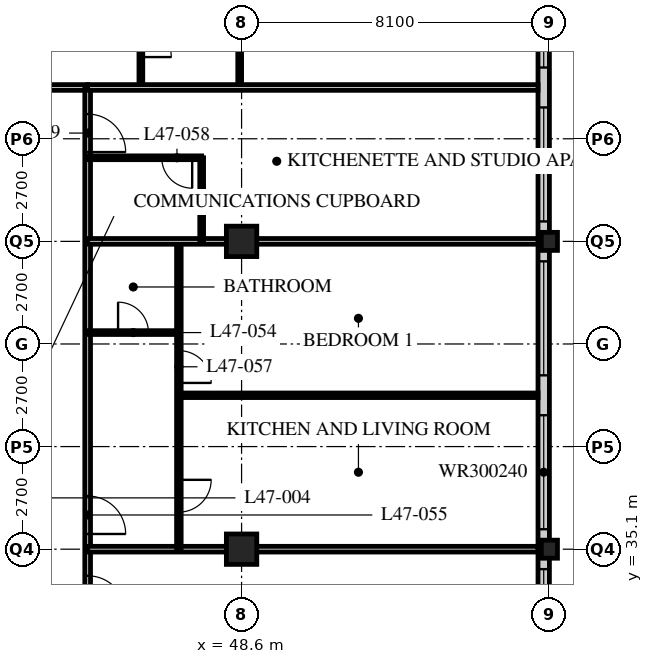
"""IFC4 building model, lengths in metres.
Left out: names, types, materials, properties, quantities, classifications, styles, units other than length and angle.
Written with IfcOpenShell. Run it as: python <this file> out.ifc"""

import sys

from ifc_helpers import new_model, si_unit, direction, frame, frame_2d, origin, origin_2d, place, context, subcontext, project, spatial, rectangle, hollow_rectangle, i_section, extrude, element, fill, save


model = new_model("IFC4")
c1 = context("Model", 3, precision=1e-05, world=origin(), true_north=direction((0.0, 1.0)))
c2 = subcontext(c1, "Body", "Model", "MODEL_VIEW")
j1 = project(units=[si_unit("LENGTHUNIT", "METRE"), si_unit("PLANEANGLEUNIT", "RADIAN")], contexts=[c1])
p1 = place(None, origin())
s1 = spatial("IfcSite", under=j1, at=p1, CompositionType="ELEMENT")
p2 = place(p1, origin())
s2 = spatial("IfcBuilding", under=s1, at=p2, CompositionType="ELEMENT")
p3 = place(p2, frame((0.0, 0.0, 184.8)))
s3 = spatial("IfcBuildingStorey", under=s2, at=p3, CompositionType="ELEMENT", Elevation=184.8)
for number, where, z_axis, x_axis in (
    (1, (48.6, 35.1, 0.0), (0.0, 0.0, 1.0), (1.0, 0.0, 0.0)),
    (2, (48.6, 43.2, 0.0), (0.0, 0.0, 1.0), (1.0, 0.0, 0.0)),
):
    element("IfcColumn", number, at=place(p3, frame(where, z_axis=z_axis, x_axis=x_axis)), inside=s3, PredefinedType="COLUMN", context=c2, shape_type="SweptSolid", body=[
        extrude(hollow_rectangle(XDim=0.8, YDim=0.8, WallThickness=0.08, at=origin_2d()), origin(), (0.0, 0.0, 1.0), 3.6),
    ])
for number, where, z_axis, x_axis in (
    (3, (56.7, 35.1, 0.0), (0.0, 0.0, 1.0), (1.0, 0.0, 0.0)),
    (4, (56.7, 43.2, 0.0), (0.0, 0.0, 1.0), (1.0, 0.0, 0.0)),
):
    element("IfcColumn", number, at=place(p3, frame(where, z_axis=z_axis, x_axis=x_axis)), inside=s3, PredefinedType="COLUMN", context=c2, shape_type="SweptSolid", body=[
        extrude(i_section(OverallWidth=0.424, OverallDepth=0.475, WebThickness=0.048, FlangeThickness=0.077, FilletRadius=0.015, at=origin_2d()), origin(), (0.0, 0.0, 1.0), 3.6),
    ])
p4 = place(p3, frame((56.55, 19.2, 0.0), z_axis=(0.0, 0.0, 1.0), x_axis=(0.0, 1.0, 0.0)))
e5 = element("IfcWall", 5, at=p4, inside=s3, PredefinedType="SOLIDWALL", context=c2, shape_type="SweptSolid", body=[
    extrude(rectangle(XDim=32.1, YDim=0.3, at=frame_2d((16.05, 0.0))), origin(), (0.0, 0.0, 1.0), 3.39),
])
p5 = place(p4, frame((0.225, 0.0, 0.6)))
e6 = element("IfcOpeningElement", 6, at=p5, cuts=e5, PredefinedType="OPENING", context=c2, shape_type="SweptSolid", body=[
    extrude(rectangle(XDim=3.0, YDim=2.4, at=frame_2d((1.5, 1.2))), frame((0.0, 0.16, 0.0), z_axis=(0.0, -1.0, 0.0), x_axis=(1.0, 0.0, 0.0)), (0.0, 0.0, 1.0), 0.32),
])
p6 = place(p4, frame((4.275, 0.0, 0.6)))
e7 = element("IfcOpeningElement", 7, at=p6, cuts=e5, PredefinedType="OPENING", context=c2, shape_type="SweptSolid", body=[
    extrude(rectangle(XDim=3.0, YDim=2.4, at=frame_2d((1.5, 1.2))), frame((0.0, 0.16, 0.0), z_axis=(0.0, -1.0, 0.0), x_axis=(1.0, 0.0, 0.0)), (0.0, 0.0, 1.0), 0.32),
])
p7 = place(p4, frame((8.325, 0.0, 0.6)))
e8 = element("IfcOpeningElement", 8, at=p7, cuts=e5, PredefinedType="OPENING", context=c2, shape_type="SweptSolid", body=[
    extrude(rectangle(XDim=3.0, YDim=2.4, at=frame_2d((1.5, 1.2))), frame((0.0, 0.16, 0.0), z_axis=(0.0, -1.0, 0.0), x_axis=(1.0, 0.0, 0.0)), (0.0, 0.0, 1.0), 0.32),
])
p8 = place(p4, frame((12.375, 0.0, 0.6)))
e9 = element("IfcOpeningElement", 9, at=p8, cuts=e5, PredefinedType="OPENING", context=c2, shape_type="SweptSolid", body=[
    extrude(rectangle(XDim=3.0, YDim=2.4, at=frame_2d((1.5, 1.2))), frame((0.0, 0.16, 0.0), z_axis=(0.0, -1.0, 0.0), x_axis=(1.0, 0.0, 0.0)), (0.0, 0.0, 1.0), 0.32),
])
p9 = place(p4, frame((16.425, 0.0, 0.6)))
e10 = element("IfcOpeningElement", 10, at=p9, cuts=e5, PredefinedType="OPENING", context=c2, shape_type="SweptSolid", body=[
    extrude(rectangle(XDim=3.0, YDim=2.4, at=frame_2d((1.5, 1.2))), frame((0.0, 0.16, 0.0), z_axis=(0.0, -1.0, 0.0), x_axis=(1.0, 0.0, 0.0)), (0.0, 0.0, 1.0), 0.32),
])
p10 = place(p4, frame((20.475, 0.0, 0.6)))
e11 = element("IfcOpeningElement", 11, at=p10, cuts=e5, PredefinedType="OPENING", context=c2, shape_type="SweptSolid", body=[
    extrude(rectangle(XDim=3.0, YDim=2.4, at=frame_2d((1.5, 1.2))), frame((0.0, 0.16, 0.0), z_axis=(0.0, -1.0, 0.0), x_axis=(1.0, 0.0, 0.0)), (0.0, 0.0, 1.0), 0.32),
])
p11 = place(p4, frame((24.525, 0.0, 0.6)))
e12 = element("IfcOpeningElement", 12, at=p11, cuts=e5, PredefinedType="OPENING", context=c2, shape_type="SweptSolid", body=[
    extrude(rectangle(XDim=3.0, YDim=2.4, at=frame_2d((1.5, 1.2))), frame((0.0, 0.16, 0.0), z_axis=(0.0, -1.0, 0.0), x_axis=(1.0, 0.0, 0.0)), (0.0, 0.0, 1.0), 0.32),
])
p12 = place(p4, frame((28.575, 0.0, 0.6)))
e13 = element("IfcOpeningElement", 13, at=p12, cuts=e5, PredefinedType="OPENING", context=c2, shape_type="SweptSolid", body=[
    extrude(rectangle(XDim=3.0, YDim=2.4, at=frame_2d((1.5, 1.2))), frame((0.0, 0.16, 0.0), z_axis=(0.0, -1.0, 0.0), x_axis=(1.0, 0.0, 0.0)), (0.0, 0.0, 1.0), 0.32),
])
p13 = place(p3, frame((12.15, 47.25, 0.0), z_axis=(0.0, 0.0, 1.0), x_axis=(1.0, 0.0, 0.0)))
e14 = element("IfcWall", 14, at=p13, inside=s3, PredefinedType="PARTITIONING", context=c2, shape_type="SweptSolid", body=[
    extrude(rectangle(XDim=32.4, YDim=0.15, at=frame_2d((16.2, 0.0))), origin(), (0.0, 0.0, 1.0), 3.39),
])
p14 = place(p13, frame((4.45, 0.0, 0.0)))
e15 = element("IfcOpeningElement", 15, at=p14, cuts=e14, PredefinedType="OPENING", context=c2, shape_type="SweptSolid", body=[
    extrude(rectangle(XDim=1.0, YDim=2.1, at=frame_2d((0.5, 1.05))), frame((0.0, 0.085, 0.0), z_axis=(0.0, -1.0, 0.0), x_axis=(1.0, 0.0, 0.0)), (0.0, 0.0, 1.0), 0.17),
])
p15 = place(p13, frame((16.6, 0.0, 0.0)))
e16 = element("IfcOpeningElement", 16, at=p15, cuts=e14, PredefinedType="OPENING", context=c2, shape_type="SweptSolid", body=[
    extrude(rectangle(XDim=1.0, YDim=2.1, at=frame_2d((0.5, 1.05))), frame((0.0, 0.085, 0.0), z_axis=(0.0, -1.0, 0.0), x_axis=(1.0, 0.0, 0.0)), (0.0, 0.0, 1.0), 0.17),
])
p16 = place(p13, frame((29.875, 0.0, 0.0)))
e17 = element("IfcOpeningElement", 17, at=p16, cuts=e14, PredefinedType="OPENING", context=c2, shape_type="SweptSolid", body=[
    extrude(rectangle(XDim=1.0, YDim=2.1, at=frame_2d((0.5, 1.05))), frame((0.0, 0.085, 0.0), z_axis=(0.0, -1.0, 0.0), x_axis=(1.0, 0.0, 0.0)), (0.0, 0.0, 1.0), 0.17),
])
p17 = place(p13, frame((1.525, 0.0, 0.0)))
e18 = element("IfcOpeningElement", 18, at=p17, cuts=e14, PredefinedType="OPENING", context=c2, shape_type="SweptSolid", body=[
    extrude(rectangle(XDim=1.0, YDim=2.1, at=frame_2d((0.5, 1.05))), frame((0.0, 0.085, 0.0), z_axis=(0.0, -1.0, 0.0), x_axis=(1.0, 0.0, 0.0)), (0.0, 0.0, 1.0), 0.17),
])
p18 = place(p3, frame((44.55, 18.9, 0.0), z_axis=(0.0, 0.0, 1.0), x_axis=(0.0, 1.0, 0.0)))
e19 = element("IfcWall", 19, at=p18, inside=s3, PredefinedType="PARTITIONING", context=c2, shape_type="SweptSolid", body=[
    extrude(rectangle(XDim=28.35, YDim=0.15, at=frame_2d((14.175, 0.0))), origin(), (0.0, 0.0, 1.0), 3.39),
])
p19 = place(p18, frame((0.4, 0.0, 0.0)))
e20 = element("IfcOpeningElement", 20, at=p19, cuts=e19, PredefinedType="OPENING", context=c2, shape_type="SweptSolid", body=[
    extrude(rectangle(XDim=1.0, YDim=2.1, at=frame_2d((0.5, 1.05))), frame((0.0, 0.085, 0.0), z_axis=(0.0, -1.0, 0.0), x_axis=(1.0, 0.0, 0.0)), (0.0, 0.0, 1.0), 0.17),
])
p20 = place(p18, frame((10.45, 0.0, 0.0)))
e21 = element("IfcOpeningElement", 21, at=p20, cuts=e19, PredefinedType="OPENING", context=c2, shape_type="SweptSolid", body=[
    extrude(rectangle(XDim=1.0, YDim=2.1, at=frame_2d((0.5, 1.05))), frame((0.0, 0.085, 0.0), z_axis=(0.0, -1.0, 0.0), x_axis=(1.0, 0.0, 0.0)), (0.0, 0.0, 1.0), 0.17),
])
p21 = place(p18, frame((14.5, 0.0, 0.0)))
e22 = element("IfcOpeningElement", 22, at=p21, cuts=e19, PredefinedType="OPENING", context=c2, shape_type="SweptSolid", body=[
    extrude(rectangle(XDim=1.0, YDim=2.1, at=frame_2d((0.5, 1.05))), frame((0.0, 0.085, 0.0), z_axis=(0.0, -1.0, 0.0), x_axis=(1.0, 0.0, 0.0)), (0.0, 0.0, 1.0), 0.17),
])
p22 = place(p18, frame((16.6, 0.0, 0.0)))
e23 = element("IfcOpeningElement", 23, at=p22, cuts=e19, PredefinedType="OPENING", context=c2, shape_type="SweptSolid", body=[
    extrude(rectangle(XDim=1.0, YDim=2.1, at=frame_2d((0.5, 1.05))), frame((0.0, 0.085, 0.0), z_axis=(0.0, -1.0, 0.0), x_axis=(1.0, 0.0, 0.0)), (0.0, 0.0, 1.0), 0.17),
])
p23 = place(p18, frame((26.65, 0.0, 0.0)))
e24 = element("IfcOpeningElement", 24, at=p23, cuts=e19, PredefinedType="OPENING", context=c2, shape_type="SweptSolid", body=[
    extrude(rectangle(XDim=1.0, YDim=2.1, at=frame_2d((0.5, 1.05))), frame((0.0, 0.085, 0.0), z_axis=(0.0, -1.0, 0.0), x_axis=(1.0, 0.0, 0.0)), (0.0, 0.0, 1.0), 0.17),
])
p24 = place(p3, frame((44.55, 35.1, 0.0), z_axis=(0.0, 0.0, 1.0), x_axis=(1.0, 0.0, 0.0)))
e25 = element("IfcWall", 25, at=p24, inside=s3, PredefinedType="PARTITIONING", context=c2, shape_type="SweptSolid", body=[
    extrude(rectangle(XDim=11.85, YDim=0.15, at=frame_2d((5.925, 0.0))), origin(), (0.0, 0.0, 1.0), 2.778),
])
p25 = place(p3, frame((46.95, 35.1, 0.0), z_axis=(0.0, 0.0, 1.0), x_axis=(0.0, 1.0, 0.0)))
e26 = element("IfcWall", 26, at=p25, inside=s3, PredefinedType="PARTITIONING", context=c2, shape_type="SweptSolid", body=[
    extrude(rectangle(XDim=8.1, YDim=0.12, at=frame_2d((4.05, 0.0))), origin(), (0.0, 0.0, 1.0), 3.39),
])
p26 = place(p25, frame((0.975, 0.0, 0.0)))
e27 = element("IfcOpeningElement", 27, at=p26, cuts=e26, PredefinedType="OPENING", context=c2, shape_type="SweptSolid", body=[
    extrude(rectangle(XDim=0.85, YDim=2.1, at=frame_2d((0.425, 1.05))), frame((0.0, 0.07, 0.0), z_axis=(0.0, -1.0, 0.0), x_axis=(1.0, 0.0, 0.0)), (0.0, 0.0, 1.0), 0.14),
])
p27 = place(p25, frame((4.375, 0.0, 0.0)))
e28 = element("IfcOpeningElement", 28, at=p27, cuts=e26, PredefinedType="OPENING", context=c2, shape_type="SweptSolid", body=[
    extrude(rectangle(XDim=0.85, YDim=2.1, at=frame_2d((0.425, 1.05))), frame((0.0, 0.07, 0.0), z_axis=(0.0, -1.0, 0.0), x_axis=(1.0, 0.0, 0.0)), (0.0, 0.0, 1.0), 0.14),
])
p28 = place(p3, frame((44.55, 40.8, 0.0), z_axis=(0.0, 0.0, 1.0), x_axis=(1.0, 0.0, 0.0)))
e29 = element("IfcWall", 29, at=p28, inside=s3, PredefinedType="PARTITIONING", context=c2, shape_type="SweptSolid", body=[
    extrude(rectangle(XDim=2.4, YDim=0.1, at=frame_2d((1.2, 0.0))), origin(), (0.0, 0.0, 1.0), 3.39),
])
p29 = place(p28, frame((0.8, 0.0, 0.0)))
e30 = element("IfcOpeningElement", 30, at=p29, cuts=e29, PredefinedType="OPENING", context=c2, shape_type="SweptSolid", body=[
    extrude(rectangle(XDim=0.8, YDim=2.1, at=frame_2d((0.4, 1.05))), frame((0.0, 0.06, 0.0), z_axis=(0.0, -1.0, 0.0), x_axis=(1.0, 0.0, 0.0)), (0.0, 0.0, 1.0), 0.12),
])
p30 = place(p3, frame((46.95, 39.15, 0.0), z_axis=(0.0, 0.0, 1.0), x_axis=(1.0, 0.0, 0.0)))
e31 = element("IfcWall", 31, at=p30, inside=s3, PredefinedType="PARTITIONING", context=c2, shape_type="SweptSolid", body=[
    extrude(rectangle(XDim=9.45, YDim=0.12, at=frame_2d((4.725, 0.0))), origin(), (0.0, 0.0, 1.0), 3.39),
])
p31 = place(p3, frame((44.55, 43.2, 0.0), z_axis=(0.0, 0.0, 1.0), x_axis=(1.0, 0.0, 0.0)))
e32 = element("IfcWall", 32, at=p31, inside=s3, PredefinedType="PARTITIONING", context=c2, shape_type="SweptSolid", body=[
    extrude(rectangle(XDim=11.85, YDim=0.15, at=frame_2d((5.925, 0.0))), origin(), (0.0, 0.0, 1.0), 2.778),
])
p32 = place(p3, frame((47.55, 43.2, 0.0), z_axis=(0.0, 0.0, 1.0), x_axis=(0.0, 1.0, 0.0)))
e33 = element("IfcWall", 33, at=p32, inside=s3, PredefinedType="PARTITIONING", context=c2, shape_type="SweptSolid", body=[
    extrude(rectangle(XDim=2.2, YDim=0.1, at=frame_2d((1.1, 0.0))), origin(), (0.0, 0.0, 1.0), 3.39),
])
p33 = place(p3, frame((44.55, 45.4, 0.0), z_axis=(0.0, 0.0, 1.0), x_axis=(1.0, 0.0, 0.0)))
e34 = element("IfcWall", 34, at=p33, inside=s3, PredefinedType="PARTITIONING", context=c2, shape_type="SweptSolid", body=[
    extrude(rectangle(XDim=3.0, YDim=0.1, at=frame_2d((1.5, 0.0))), origin(), (0.0, 0.0, 1.0), 3.39),
])
p34 = place(p33, frame((1.95, 0.0, 0.0)))
e35 = element("IfcOpeningElement", 35, at=p34, cuts=e34, PredefinedType="OPENING", context=c2, shape_type="SweptSolid", body=[
    extrude(rectangle(XDim=0.8, YDim=2.1, at=frame_2d((0.4, 1.05))), frame((0.0, 0.06, 0.0), z_axis=(0.0, -1.0, 0.0), x_axis=(1.0, 0.0, 0.0)), (0.0, 0.0, 1.0), 0.12),
])
p35 = place(p3, frame((45.95, 47.25, 0.0), z_axis=(0.0, 0.0, 1.0), x_axis=(0.0, 1.0, 0.0)))
e36 = element("IfcWall", 36, at=p35, inside=s3, PredefinedType="PARTITIONING", context=c2, shape_type="SweptSolid", body=[
    extrude(rectangle(XDim=2.4, YDim=0.1, at=frame_2d((1.2, 0.0))), origin(), (0.0, 0.0, 1.0), 3.39),
])
p36 = place(p35, frame((0.8, 0.0, 0.0)))
e37 = element("IfcOpeningElement", 37, at=p36, cuts=e36, PredefinedType="OPENING", context=c2, shape_type="SweptSolid", body=[
    extrude(rectangle(XDim=0.8, YDim=2.1, at=frame_2d((0.4, 1.05))), frame((0.0, 0.06, 0.0), z_axis=(0.0, -1.0, 0.0), x_axis=(1.0, 0.0, 0.0)), (0.0, 0.0, 1.0), 0.12),
])
p37 = place(p3, frame((48.55, 47.25, 0.0), z_axis=(0.0, 0.0, 1.0), x_axis=(0.0, 1.0, 0.0)))
e38 = element("IfcWall", 38, at=p37, inside=s3, PredefinedType="PARTITIONING", context=c2, shape_type="SweptSolid", body=[
    extrude(rectangle(XDim=2.4, YDim=0.1, at=frame_2d((1.2, 0.0))), origin(), (0.0, 0.0, 1.0), 2.778),
])
p38 = place(p3, frame((44.55, 47.25, 0.0), z_axis=(0.0, 0.0, 1.0), x_axis=(1.0, 0.0, 0.0)))
e39 = element("IfcWall", 39, at=p38, inside=s3, PredefinedType="PARTITIONING", context=c2, shape_type="SweptSolid", body=[
    extrude(rectangle(XDim=11.85, YDim=0.15, at=frame_2d((5.925, 0.0))), origin(), (0.0, 0.0, 1.0), 3.39),
])
p39 = place(p8, origin())
e40 = element("IfcWindow", 40, at=p39, inside=s3, PartitioningType="SINGLE_PANEL", PredefinedType="WINDOW", context=c2, shape_type="SweptSolid", body=[
    extrude(rectangle(XDim=3.0, YDim=2.4, at=frame_2d((1.5, 1.2))), frame((0.0, 0.03, 0.0), z_axis=(0.0, -1.0, 0.0), x_axis=(1.0, 0.0, 0.0)), (0.0, 0.0, 1.0), 0.06),
])
fill(e9, e40)
p40 = place(p9, origin())
e41 = element("IfcWindow", 41, at=p40, inside=s3, PartitioningType="SINGLE_PANEL", PredefinedType="WINDOW", context=c2, shape_type="SweptSolid", body=[
    extrude(rectangle(XDim=3.0, YDim=2.4, at=frame_2d((1.5, 1.2))), frame((0.0, 0.03, 0.0), z_axis=(0.0, -1.0, 0.0), x_axis=(1.0, 0.0, 0.0)), (0.0, 0.0, 1.0), 0.06),
])
fill(e10, e41)
p41 = place(p10, origin())
e42 = element("IfcWindow", 42, at=p41, inside=s3, PartitioningType="SINGLE_PANEL", PredefinedType="WINDOW", context=c2, shape_type="SweptSolid", body=[
    extrude(rectangle(XDim=3.0, YDim=2.4, at=frame_2d((1.5, 1.2))), frame((0.0, 0.03, 0.0), z_axis=(0.0, -1.0, 0.0), x_axis=(1.0, 0.0, 0.0)), (0.0, 0.0, 1.0), 0.06),
])
fill(e11, e42)
p42 = place(p11, origin())
e43 = element("IfcWindow", 43, at=p42, inside=s3, PartitioningType="SINGLE_PANEL", PredefinedType="WINDOW", context=c2, shape_type="SweptSolid", body=[
    extrude(rectangle(XDim=3.0, YDim=2.4, at=frame_2d((1.5, 1.2))), frame((0.0, 0.03, 0.0), z_axis=(0.0, -1.0, 0.0), x_axis=(1.0, 0.0, 0.0)), (0.0, 0.0, 1.0), 0.06),
])
fill(e12, e43)
p43 = place(p12, origin())
e44 = element("IfcWindow", 44, at=p43, inside=s3, PartitioningType="SINGLE_PANEL", PredefinedType="WINDOW", context=c2, shape_type="SweptSolid", body=[
    extrude(rectangle(XDim=3.0, YDim=2.4, at=frame_2d((1.5, 1.2))), frame((0.0, 0.03, 0.0), z_axis=(0.0, -1.0, 0.0), x_axis=(1.0, 0.0, 0.0)), (0.0, 0.0, 1.0), 0.06),
])
fill(e13, e44)
p44 = place(p21, origin())
e45 = element("IfcDoor", 45, at=p44, inside=s3, OperationType="SINGLE_SWING_RIGHT", PredefinedType="DOOR", context=c2, shape_type="SweptSolid", body=[
    extrude(rectangle(XDim=1.0, YDim=2.1, at=frame_2d((0.5, 1.05))), frame((0.0, 0.025, 0.0), z_axis=(0.0, -1.0, 0.0), x_axis=(1.0, 0.0, 0.0)), (0.0, 0.0, 1.0), 0.05),
])
fill(e22, e45)
p45 = place(p29, origin())
e46 = element("IfcDoor", 46, at=p45, inside=s3, OperationType="SINGLE_SWING_LEFT", PredefinedType="DOOR", context=c2, shape_type="SweptSolid", body=[
    extrude(rectangle(XDim=0.8, YDim=2.1, at=frame_2d((0.4, 1.05))), frame((0.0, 0.025, 0.0), z_axis=(0.0, -1.0, 0.0), x_axis=(1.0, 0.0, 0.0)), (0.0, 0.0, 1.0), 0.05),
])
fill(e30, e46)
p46 = place(p22, origin())
e47 = element("IfcDoor", 47, at=p46, inside=s3, OperationType="SINGLE_SWING_RIGHT", PredefinedType="DOOR", context=c2, shape_type="SweptSolid", body=[
    extrude(rectangle(XDim=1.0, YDim=2.1, at=frame_2d((0.5, 1.05))), frame((0.0, 0.025, 0.0), z_axis=(0.0, -1.0, 0.0), x_axis=(1.0, 0.0, 0.0)), (0.0, 0.0, 1.0), 0.05),
])
fill(e23, e47)
p47 = place(p26, origin())
e48 = element("IfcDoor", 48, at=p47, inside=s3, OperationType="SINGLE_SWING_LEFT", PredefinedType="DOOR", context=c2, shape_type="SweptSolid", body=[
    extrude(rectangle(XDim=0.85, YDim=2.1, at=frame_2d((0.425, 1.05))), frame((0.0, 0.025, 0.0), z_axis=(0.0, -1.0, 0.0), x_axis=(1.0, 0.0, 0.0)), (0.0, 0.0, 1.0), 0.05),
])
fill(e27, e48)
p48 = place(p27, origin())
e49 = element("IfcDoor", 49, at=p48, inside=s3, OperationType="SINGLE_SWING_RIGHT", PredefinedType="DOOR", context=c2, shape_type="SweptSolid", body=[
    extrude(rectangle(XDim=0.85, YDim=2.1, at=frame_2d((0.425, 1.05))), frame((0.0, 0.025, 0.0), z_axis=(0.0, -1.0, 0.0), x_axis=(1.0, 0.0, 0.0)), (0.0, 0.0, 1.0), 0.05),
])
fill(e28, e49)
p49 = place(p34, origin())
e50 = element("IfcDoor", 50, at=p49, inside=s3, OperationType="SINGLE_SWING_LEFT", PredefinedType="DOOR", context=c2, shape_type="SweptSolid", body=[
    extrude(rectangle(XDim=0.8, YDim=2.1, at=frame_2d((0.4, 1.05))), frame((0.0, 0.025, 0.0), z_axis=(0.0, -1.0, 0.0), x_axis=(1.0, 0.0, 0.0)), (0.0, 0.0, 1.0), 0.05),
])
fill(e35, e50)
p50 = place(p23, origin())
e51 = element("IfcDoor", 51, at=p50, inside=s3, OperationType="SINGLE_SWING_RIGHT", PredefinedType="DOOR", context=c2, shape_type="SweptSolid", body=[
    extrude(rectangle(XDim=1.0, YDim=2.1, at=frame_2d((0.5, 1.05))), frame((0.0, 0.025, 0.0), z_axis=(0.0, -1.0, 0.0), x_axis=(1.0, 0.0, 0.0)), (0.0, 0.0, 1.0), 0.05),
])
fill(e24, e51)
p51 = place(p36, origin())
e52 = element("IfcDoor", 52, at=p51, inside=s3, OperationType="SINGLE_SWING_RIGHT", PredefinedType="DOOR", context=c2, shape_type="SweptSolid", body=[
    extrude(rectangle(XDim=0.8, YDim=2.1, at=frame_2d((0.4, 1.05))), frame((0.0, 0.025, 0.0), z_axis=(0.0, -1.0, 0.0), x_axis=(1.0, 0.0, 0.0)), (0.0, 0.0, 1.0), 0.05),
])
fill(e37, e52)
save(model, sys.argv[1])
